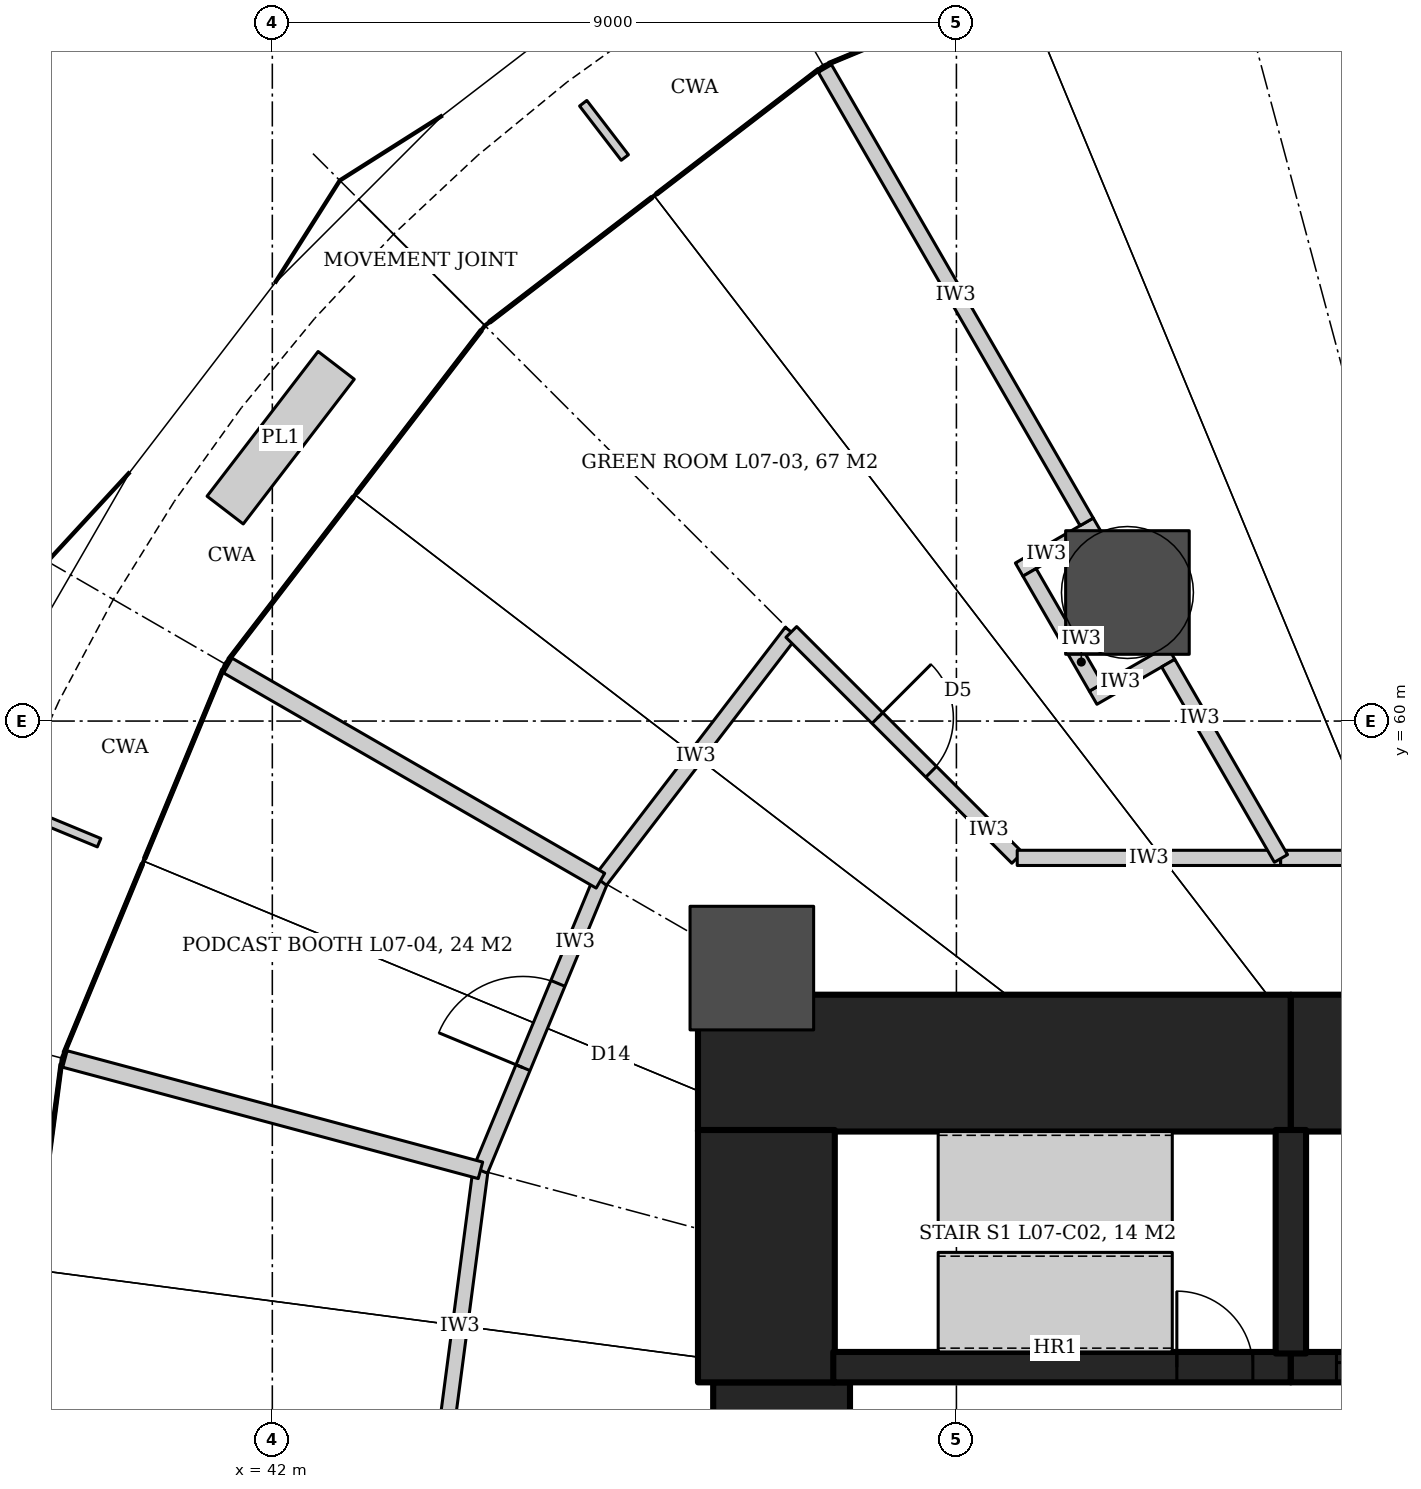
"""IFC4 building model, lengths in metres.
Left out: names, types, materials, properties, quantities, classifications, styles, units other than length and angle.
Written with IfcOpenShell. Run it as: python <this file> out.ifc"""

import sys

from ifc_helpers import new_model, si_unit, direction, frame, frame_2d, origin, origin_2d, place, context, subcontext, project, spatial, rectangle, hollow_circle, extrude, element, fill, save


model = new_model("IFC4")
c1 = context("Model", 3, precision=1e-05, world=origin(), true_north=direction((0.0, 1.0)))
c2 = subcontext(c1, "Body", "Model", "MODEL_VIEW")
j1 = project(units=[si_unit("LENGTHUNIT", "METRE"), si_unit("PLANEANGLEUNIT", "RADIAN")], contexts=[c1])
p1 = place(None, origin())
s1 = spatial("IfcSite", under=j1, at=p1, CompositionType="ELEMENT")
p2 = place(p1, origin())
s2 = spatial("IfcBuilding", under=s1, at=p2, CompositionType="ELEMENT")
p3 = place(p2, frame((0.0, 0.0, 30.2)))
s3 = spatial("IfcBuildingStorey", under=s2, at=p3, CompositionType="ELEMENT", Elevation=30.2)
p4 = place(p3, frame((47.6, 55.5, 0.0), z_axis=(0.0, 0.0, 1.0), x_axis=(1.0, 0.0, 0.0)))
e1 = element("IfcWall", 1, at=p4, inside=s3, PredefinedType="SHEAR", context=c2, shape_type="SweptSolid", body=[
    extrude(rectangle(XDim=7.8, YDim=1.8, at=frame_2d((3.9, 0.0))), origin(), (0.0, 0.0, 1.0), 4.2),
])
p5 = place(p3, frame((55.4, 55.5, 0.0), z_axis=(0.0, 0.0, 1.0), x_axis=(1.0, 0.0, 0.0)))
e2 = element("IfcWall", 2, at=p5, inside=s3, PredefinedType="SHEAR", context=c2, shape_type="SweptSolid", body=[
    extrude(rectangle(XDim=9.2, YDim=1.8, at=frame_2d((4.6, 0.0))), origin(), (0.0, 0.0, 1.0), 4.2),
])
p6 = place(p3, frame((48.7, 48.7, 0.0), z_axis=(0.0, 0.0, 1.0), x_axis=(0.0, 1.0, 0.0)))
e3 = element("IfcWall", 3, at=p6, inside=s3, PredefinedType="SHEAR", context=c2, shape_type="SweptSolid", body=[
    extrude(rectangle(XDim=2.6, YDim=1.8, at=frame_2d((1.3, 0.0))), origin(), (0.0, 0.0, 1.0), 4.2),
])
p7 = place(p6, frame((0.4, 0.0, 0.0)))
e4 = element("IfcOpeningElement", 4, at=p7, cuts=e3, PredefinedType="OPENING", context=c2, shape_type="SweptSolid", body=[
    extrude(rectangle(XDim=1.8, YDim=2.1, at=frame_2d((0.9, 1.05))), frame((0.0, 0.91, 0.0), z_axis=(0.0, -1.0, 0.0), x_axis=(1.0, 0.0, 0.0)), (0.0, 0.0, 1.0), 1.82),
])
p8 = place(p3, frame((48.5, 51.3, 0.0), z_axis=(0.0, 0.0, 1.0), x_axis=(0.0, 1.0, 0.0)))
e5 = element("IfcWall", 5, at=p8, inside=s3, PredefinedType="SHEAR", context=c2, shape_type="SweptSolid", body=[
    extrude(rectangle(XDim=3.32, YDim=1.8, at=frame_2d((1.66, 0.0))), origin(), (0.0, 0.0, 1.0), 4.2),
])
p9 = place(p3, frame((49.38, 51.5, 0.0), z_axis=(0.0, 0.0, 1.0), x_axis=(1.0, 0.0, 0.0)))
e6 = element("IfcWall", 6, at=p9, inside=s3, PredefinedType="SHEAR", context=c2, shape_type="SweptSolid", body=[
    extrude(rectangle(XDim=6.02, YDim=0.4, at=frame_2d((3.01, 0.0))), origin(), (0.0, 0.0, 1.0), 4.2),
])
p10 = place(p9, frame((4.52, 0.0, 0.0)))
e7 = element("IfcOpeningElement", 7, at=p10, cuts=e6, PredefinedType="OPENING", context=c2, shape_type="SweptSolid", body=[
    extrude(rectangle(XDim=1.0, YDim=2.1, at=frame_2d((0.5, 1.05))), frame((0.0, 0.21, 0.0), z_axis=(0.0, -1.0, 0.0), x_axis=(1.0, 0.0, 0.0)), (0.0, 0.0, 1.0), 0.42),
])
p11 = place(p3, frame((55.4, 51.5, 0.0), z_axis=(0.0, 0.0, 1.0), x_axis=(1.0, 0.0, 0.0)))
e8 = element("IfcWall", 8, at=p11, inside=s3, PredefinedType="SHEAR", context=c2, shape_type="SweptSolid", body=[
    extrude(rectangle(XDim=9.2, YDim=0.4, at=frame_2d((4.6, 0.0))), origin(), (0.0, 0.0, 1.0), 4.2),
])
p12 = place(p11, frame((0.6, 0.0, 0.0)))
e9 = element("IfcOpeningElement", 9, at=p12, cuts=e8, PredefinedType="OPENING", context=c2, shape_type="SweptSolid", body=[
    extrude(rectangle(XDim=1.1, YDim=2.1, at=frame_2d((0.55, 1.05))), frame((0.0, 0.21, 0.0), z_axis=(0.0, -1.0, 0.0), x_axis=(1.0, 0.0, 0.0)), (0.0, 0.0, 1.0), 0.42),
])
p13 = place(p11, frame((2.9, 0.0, 0.0)))
e10 = element("IfcOpeningElement", 10, at=p13, cuts=e8, PredefinedType="OPENING", context=c2, shape_type="SweptSolid", body=[
    extrude(rectangle(XDim=1.1, YDim=2.1, at=frame_2d((0.55, 1.05))), frame((0.0, 0.21, 0.0), z_axis=(0.0, -1.0, 0.0), x_axis=(1.0, 0.0, 0.0)), (0.0, 0.0, 1.0), 0.42),
])
p14 = place(p11, frame((5.2, 0.0, 0.0)))
e11 = element("IfcOpeningElement", 11, at=p14, cuts=e8, PredefinedType="OPENING", context=c2, shape_type="SweptSolid", body=[
    extrude(rectangle(XDim=1.1, YDim=2.1, at=frame_2d((0.55, 1.05))), frame((0.0, 0.21, 0.0), z_axis=(0.0, -1.0, 0.0), x_axis=(1.0, 0.0, 0.0)), (0.0, 0.0, 1.0), 0.42),
])
p15 = place(p11, frame((7.5, 0.0, 0.0)))
e12 = element("IfcOpeningElement", 12, at=p15, cuts=e8, PredefinedType="OPENING", context=c2, shape_type="SweptSolid", body=[
    extrude(rectangle(XDim=1.1, YDim=2.1, at=frame_2d((0.55, 1.05))), frame((0.0, 0.21, 0.0), z_axis=(0.0, -1.0, 0.0), x_axis=(1.0, 0.0, 0.0)), (0.0, 0.0, 1.0), 0.42),
])
p16 = place(p3, frame((55.4, 51.68, 0.0), z_axis=(0.0, 0.0, 1.0), x_axis=(0.0, 1.0, 0.0)))
e13 = element("IfcWall", 13, at=p16, inside=s3, PredefinedType="SHEAR", context=c2, shape_type="SweptSolid", body=[
    extrude(rectangle(XDim=2.94, YDim=0.4, at=frame_2d((1.47, 0.0))), origin(), (0.0, 0.0, 1.0), 4.2),
])
for number, where, z_axis, x_axis in (
    (14, (53.25, 61.691, 0.0), (0.0, 0.0, 1.0), (1.0, 0.0, 0.0)),
    (15, (48.309, 56.75, 0.0), (0.0, 0.0, 1.0), (1.0, 0.0, 0.0)),
):
    element("IfcColumn", number, at=place(p3, frame(where, z_axis=z_axis, x_axis=x_axis)), inside=s3, PredefinedType="COLUMN", context=c2, shape_type="SweptSolid", body=[
        extrude(hollow_circle(Radius=0.813, WallThickness=0.08, at=origin_2d()), origin(), (0.0, 0.0, 1.0), 4.2),
    ])
p17 = place(p3, frame((44.2, 50.0, 0.0), z_axis=(0.0, 0.0, 1.0), x_axis=(0.130515758099, 0.991446234996, 0.0)))
e16 = element("IfcWall", 16, at=p17, inside=s3, PredefinedType="PARTITIONING", context=c2, shape_type="SweptSolid", body=[
    extrude(rectangle(XDim=4.125, YDim=0.2, at=frame_2d((2.062, 0.0))), origin(), (0.0, 0.0, 1.0), 3.04),
])
p18 = place(p3, frame((44.738, 54.089, 0.0), z_axis=(0.0, 0.0, 1.0), x_axis=(0.382731667114, 0.923859551549, 0.0)))
e17 = element("IfcWall", 17, at=p18, inside=s3, PredefinedType="PARTITIONING", context=c2, shape_type="SweptSolid", body=[
    extrude(rectangle(XDim=4.125, YDim=0.2, at=frame_2d((2.062, 0.0))), origin(), (0.0, 0.0, 1.0), 3.04),
])
p19 = place(p18, frame((1.462, 0.0, 0.0)))
e18 = element("IfcOpeningElement", 18, at=p19, cuts=e17, PredefinedType="OPENING", context=c2, shape_type="SweptSolid", body=[
    extrude(rectangle(XDim=1.2, YDim=2.4, at=frame_2d((0.6, 1.2))), frame((0.0, 0.11, 0.0), z_axis=(0.0, -1.0, 0.0), x_axis=(1.0, 0.0, 0.0)), (0.0, 0.0, 1.0), 0.22),
])
p20 = place(p3, frame((46.317, 57.9, 0.0), z_axis=(0.0, 0.0, 1.0), x_axis=(0.608714823874, 0.793389099494, 0.0)))
e19 = element("IfcWall", 19, at=p20, inside=s3, PredefinedType="PARTITIONING", context=c2, shape_type="SweptSolid", body=[
    extrude(rectangle(XDim=4.125, YDim=0.2, at=frame_2d((2.062, 0.0))), origin(), (0.0, 0.0, 1.0), 3.04),
])
p21 = place(p3, frame((48.828, 61.172, 0.0), z_axis=(0.0, 0.0, 1.0), x_axis=(0.707106781187, -0.707106781187, 0.0)))
e20 = element("IfcWall", 20, at=p21, inside=s3, PredefinedType="PARTITIONING", context=c2, shape_type="SweptSolid", body=[
    extrude(rectangle(XDim=4.204, YDim=0.2, at=frame_2d((2.102, 0.0))), origin(), (0.0, 0.0, 1.0), 3.02),
])
p22 = place(p21, frame((1.602, 0.0, 0.0)))
e21 = element("IfcOpeningElement", 21, at=p22, cuts=e20, PredefinedType="OPENING", context=c2, shape_type="SweptSolid", body=[
    extrude(rectangle(XDim=1.0, YDim=2.1, at=frame_2d((0.5, 1.05))), frame((0.0, 0.11, 0.0), z_axis=(0.0, -1.0, 0.0), x_axis=(1.0, 0.0, 0.0)), (0.0, 0.0, 1.0), 0.22),
])
p23 = place(p3, frame((51.8, 58.2, 0.0), z_axis=(0.0, 0.0, 1.0), x_axis=(1.0, 0.0, 0.0)))
e22 = element("IfcWall", 22, at=p23, inside=s3, PredefinedType="PARTITIONING", context=c2, shape_type="SweptSolid", body=[
    extrude(rectangle(XDim=3.466, YDim=0.2, at=frame_2d((1.733, 0.0))), origin(), (0.0, 0.0, 1.0), 3.04),
])
p24 = place(p3, frame((55.266, 58.2, 0.0), z_axis=(0.0, 0.0, 1.0), x_axis=(1.0, 0.0, 0.0)))
e23 = element("IfcWall", 23, at=p24, inside=s3, PredefinedType="PARTITIONING", context=c2, shape_type="SweptSolid", body=[
    extrude(rectangle(XDim=12.934, YDim=0.2, at=frame_2d((6.467, 0.0))), origin(), (0.0, 0.0, 1.0), 3.04),
])
p25 = place(p24, frame((5.467, 0.0, 0.0)))
e24 = element("IfcOpeningElement", 24, at=p25, cuts=e23, PredefinedType="OPENING", context=c2, shape_type="SweptSolid", body=[
    extrude(rectangle(XDim=2.0, YDim=2.1, at=frame_2d((1.0, 1.05))), frame((0.0, 0.11, 0.0), z_axis=(0.0, -1.0, 0.0), x_axis=(1.0, 0.0, 0.0)), (0.0, 0.0, 1.0), 0.22),
])
for number, where, z_axis, x_axis in (
    (25, (53.823, 60.899, 0.0), (0.0, 0.0, 1.0), (-0.866, -0.5, 0.0)),
    (26, (52.85, 62.584, 0.0), (0.0, 0.0, 1.0), (-0.866, -0.5, 0.0)),
):
    element("IfcWall", number, at=place(p3, frame(where, z_axis=z_axis, x_axis=x_axis)), inside=s3, PredefinedType="PARTITIONING", context=c2, shape_type="SweptSolid", body=[
        extrude(rectangle(XDim=1.183, YDim=0.2, at=frame_2d((0.591, 0.0))), origin(), (0.0, 0.0, 1.0), 3.02),
    ])
p26 = place(p3, frame((52.835, 60.444, 0.0), z_axis=(0.0, 0.0, 1.0), x_axis=(-0.500049268192, 0.865996956912, 0.0)))
e27 = element("IfcWall", 27, at=p26, inside=s3, PredefinedType="PARTITIONING", context=c2, shape_type="SweptSolid", body=[
    extrude(rectangle(XDim=1.746, YDim=0.2, at=frame_2d((0.873, 0.0))), origin(), (0.0, 0.0, 1.0), 3.02),
])
p27 = place(p3, frame((55.27, 58.193, 0.0), z_axis=(0.0, 0.0, 1.0), x_axis=(-0.499962256537, 0.866047193886, 0.0)))
e28 = element("IfcWall", 28, at=p27, inside=s3, PredefinedType="PARTITIONING", context=c2, shape_type="SweptSolid", body=[
    extrude(rectangle(XDim=2.967, YDim=0.2, at=frame_2d((1.483, 0.0))), origin(), (0.0, 0.0, 1.0), 3.04),
])
p28 = place(p3, frame((52.713, 62.621, 0.0), z_axis=(0.0, 0.0, 1.0), x_axis=(-0.499985776458, 0.866033615595, 0.0)))
e29 = element("IfcWall", 29, at=p28, inside=s3, PredefinedType="PARTITIONING", context=c2, shape_type="SweptSolid", body=[
    extrude(rectangle(XDim=6.287, YDim=0.2, at=frame_2d((3.144, 0.0))), origin(), (0.0, 0.0, 1.0), 3.04),
])
p29 = place(p3, frame((46.317, 57.9, 0.0), z_axis=(0.0, 0.0, 1.0), x_axis=(-0.866022478443, 0.500005066806, 0.0)))
e30 = element("IfcWall", 30, at=p29, inside=s3, PredefinedType="PARTITIONING", context=c2, shape_type="SweptSolid", body=[
    extrude(rectangle(XDim=5.06, YDim=0.225, at=frame_2d((2.53, 0.0))), origin(), (0.0, 0.0, 1.0), 3.04),
])
p30 = place(p3, frame((44.738, 54.089, 0.0), z_axis=(0.0, 0.0, 1.0), x_axis=(-0.965926729572, 0.258815673981, 0.0)))
e31 = element("IfcWall", 31, at=p30, inside=s3, PredefinedType="PARTITIONING", context=c2, shape_type="SweptSolid", body=[
    extrude(rectangle(XDim=5.06, YDim=0.225, at=frame_2d((2.53, 0.0))), origin(), (0.0, 0.0, 1.0), 3.04),
])
p31 = place(p22, origin())
e32 = element("IfcDoor", 32, at=p31, inside=s3, OperationType="SINGLE_SWING_LEFT", PredefinedType="DOOR", context=c2, shape_type="SweptSolid", body=[
    extrude(rectangle(XDim=1.0, YDim=2.1, at=frame_2d((0.5, 1.05))), frame((0.0, 0.025, 0.0), z_axis=(0.0, -1.0, 0.0), x_axis=(1.0, 0.0, 0.0)), (0.0, 0.0, 1.0), 0.05),
])
fill(e21, e32)
p32 = place(p19, origin())
e33 = element("IfcDoor", 33, at=p32, inside=s3, OperationType="SINGLE_SWING_LEFT", PredefinedType="DOOR", context=c2, shape_type="SweptSolid", body=[
    extrude(rectangle(XDim=1.2, YDim=2.4, at=frame_2d((0.6, 1.2))), frame((0.0, 0.025, 0.0), z_axis=(0.0, -1.0, 0.0), x_axis=(1.0, 0.0, 0.0)), (0.0, 0.0, 1.0), 0.05),
])
fill(e18, e33)
p33 = place(p10, origin())
e34 = element("IfcDoor", 34, at=p33, inside=s3, OperationType="SINGLE_SWING_LEFT", PredefinedType="DOOR", context=c2, shape_type="SweptSolid", body=[
    extrude(rectangle(XDim=1.0, YDim=2.1, at=frame_2d((0.5, 1.05))), frame((0.0, 0.025, 0.0), z_axis=(0.0, -1.0, 0.0), x_axis=(1.0, 0.0, 0.0)), (0.0, 0.0, 1.0), 0.05),
])
fill(e7, e34)
p34 = place(p12, origin())
e35 = element("IfcDoor", 35, at=p34, inside=s3, OperationType="SLIDING_TO_LEFT", PredefinedType="DOOR", context=c2, shape_type="SweptSolid", body=[
    extrude(rectangle(XDim=1.1, YDim=2.1, at=frame_2d((0.55, 1.05))), frame((0.0, 0.025, 0.0), z_axis=(0.0, -1.0, 0.0), x_axis=(1.0, 0.0, 0.0)), (0.0, 0.0, 1.0), 0.05),
])
fill(e9, e35)
save(model, sys.argv[1])
